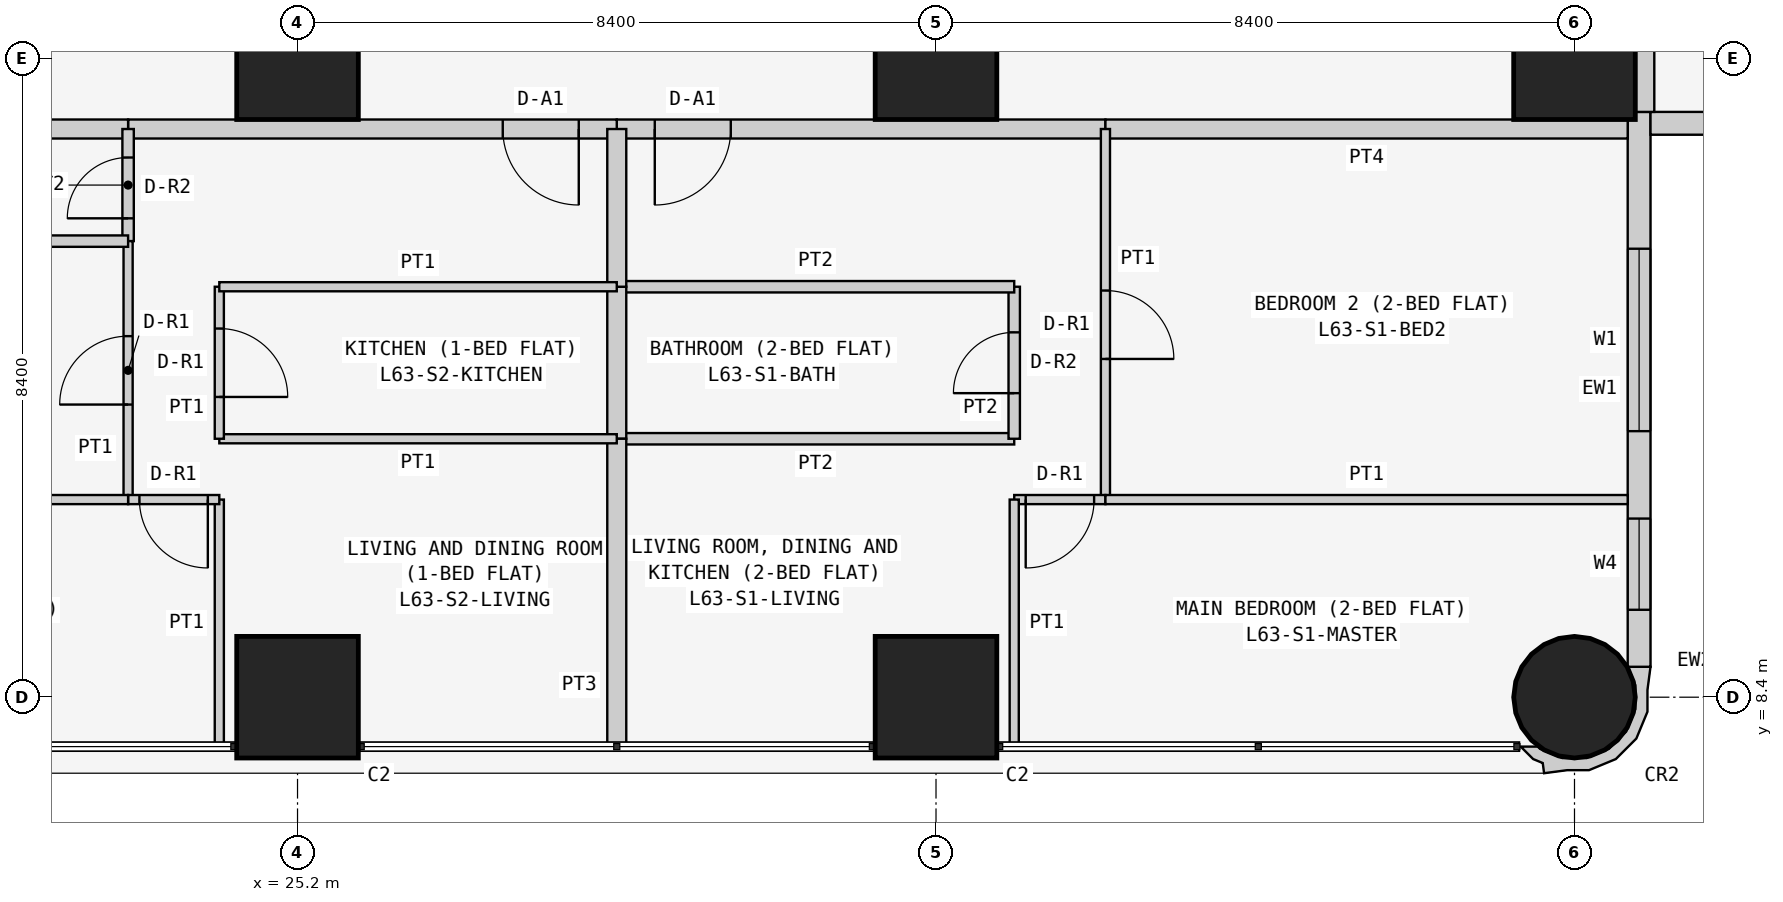
"""IFC4 building model, lengths in metres.
Left out: names, types, materials, properties, quantities, classifications, styles, units other than length and angle.
Written with IfcOpenShell. Run it as: python <this file> out.ifc"""

import sys

from ifc_helpers import new_model, si_unit, direction, frame, frame_2d, origin, origin_2d, place, context, subcontext, project, spatial, polyline, rectangle, circle, outline, extrude, element, fill, save


model = new_model("IFC4")
c1 = context("Model", 3, precision=1e-05, world=origin(), true_north=direction((0.0, 1.0)))
c2 = subcontext(c1, "Body", "Model", "MODEL_VIEW")
j1 = project(units=[si_unit("LENGTHUNIT", "METRE"), si_unit("PLANEANGLEUNIT", "RADIAN")], contexts=[c1])
p1 = place(None, origin())
s1 = spatial("IfcSite", under=j1, at=p1, CompositionType="ELEMENT")
p2 = place(p1, origin())
s2 = spatial("IfcBuilding", under=s1, at=p2, CompositionType="ELEMENT")
p3 = place(p2, frame((0.0, 0.0, 240.9)))
s3 = spatial("IfcBuildingStorey", under=s2, at=p3, CompositionType="ELEMENT", Elevation=240.9)
for number, where, z_axis, x_axis in (
    (1, (25.2, 8.4, 0.0), (0.0, 0.0, 1.0), (1.0, 0.0, 0.0)),
    (2, (25.2, 16.8, 0.0), (0.0, 0.0, 1.0), (1.0, 0.0, 0.0)),
    (3, (33.6, 8.4, 0.0), (0.0, 0.0, 1.0), (1.0, 0.0, 0.0)),
    (4, (33.6, 16.8, 0.0), (0.0, 0.0, 1.0), (1.0, 0.0, 0.0)),
):
    element("IfcColumn", number, at=place(p3, frame(where, z_axis=z_axis, x_axis=x_axis)), inside=s3, PredefinedType="COLUMN", context=c2, shape_type="SweptSolid", body=[
        extrude(rectangle(XDim=1.6, YDim=1.6, at=origin_2d()), origin(), (0.0, 0.0, 1.0), 3.6),
    ])
p4 = place(p3, frame((42.0, 8.4, 0.0), z_axis=(0.0, 0.0, 1.0), x_axis=(1.0, 0.0, 0.0)))
e5 = element("IfcColumn", 5, at=p4, inside=s3, PredefinedType="COLUMN", context=c2, shape_type="SweptSolid", body=[
    extrude(circle(Radius=0.8, at=origin_2d()), origin(), (0.0, 0.0, 1.0), 3.6),
])
p5 = place(p3, frame((42.0, 16.8, 0.0), z_axis=(0.0, 0.0, 1.0), x_axis=(1.0, 0.0, 0.0)))
e6 = element("IfcColumn", 6, at=p5, inside=s3, PredefinedType="COLUMN", context=c2, shape_type="SweptSolid", body=[
    extrude(rectangle(XDim=1.6, YDim=1.6, at=origin_2d()), origin(), (0.0, 0.0, 1.0), 3.6),
])
p6 = place(p3, frame((42.85, 8.8, 0.0), z_axis=(0.0, 0.0, 1.0), x_axis=(0.0, 1.0, 0.0)))
e7 = element("IfcWall", 7, at=p6, inside=s3, PredefinedType="SOLIDWALL", context=c2, shape_type="SweptSolid", body=[
    extrude(rectangle(XDim=7.3, YDim=0.3, at=frame_2d((3.65, 0.0))), origin(), (0.0, 0.0, 1.0), 3.45),
])
p7 = place(p6, frame((3.1, 0.0, 0.9)))
e8 = element("IfcOpeningElement", 8, at=p7, cuts=e7, PredefinedType="OPENING", context=c2, shape_type="SweptSolid", body=[
    extrude(rectangle(XDim=2.4, YDim=1.5, at=frame_2d((1.2, 0.75))), frame((0.0, 0.16, 0.0), z_axis=(0.0, -1.0, 0.0), x_axis=(1.0, 0.0, 0.0)), (0.0, 0.0, 1.0), 0.32),
])
p8 = place(p6, frame((0.75, 0.0, 0.9)))
e9 = element("IfcOpeningElement", 9, at=p8, cuts=e7, PredefinedType="OPENING", context=c2, shape_type="SweptSolid", body=[
    extrude(rectangle(XDim=1.2, YDim=1.5, at=frame_2d((0.6, 0.75))), frame((0.0, 0.16, 0.0), z_axis=(0.0, -1.0, 0.0), x_axis=(1.0, 0.0, 0.0)), (0.0, 0.0, 1.0), 0.32),
])
p9 = place(p3, frame((43.0, 15.95, 0.0), z_axis=(0.0, 0.0, 1.0), x_axis=(1.0, 0.0, 0.0)))
e10 = element("IfcWall", 10, at=p9, inside=s3, PredefinedType="SOLIDWALL", context=c2, shape_type="SweptSolid", body=[
    extrude(rectangle(XDim=7.0, YDim=0.3, at=frame_2d((3.5, 0.0))), origin(), (0.0, 0.0, 1.0), 3.45),
])
p10 = place(p9, frame((1.5, 0.0, 0.9)))
e11 = element("IfcOpeningElement", 11, at=p10, cuts=e10, PredefinedType="OPENING", context=c2, shape_type="SweptSolid", body=[
    extrude(rectangle(XDim=2.4, YDim=1.5, at=frame_2d((1.2, 0.75))), frame((0.0, 0.16, 0.0), z_axis=(0.0, -1.0, 0.0), x_axis=(1.0, 0.0, 0.0)), (0.0, 0.0, 1.0), 0.32),
])
p11 = place(p9, frame((5.05, 0.0, 0.9)))
e12 = element("IfcOpeningElement", 12, at=p11, cuts=e10, PredefinedType="OPENING", context=c2, shape_type="SweptSolid", body=[
    extrude(rectangle(XDim=1.2, YDim=1.5, at=frame_2d((0.6, 0.75))), frame((0.0, 0.16, 0.0), z_axis=(0.0, -1.0, 0.0), x_axis=(1.0, 0.0, 0.0)), (0.0, 0.0, 1.0), 0.32),
])
p12 = place(p3, frame((41.352, 7.805, 0.0), z_axis=(0.0, 0.0, 1.0), x_axis=(0.343276641956, -0.93923434088, 0.0)))
e13 = element("IfcWall", 13, at=p12, inside=s3, PredefinedType="SOLIDWALL", context=c2, shape_type="SweptSolid", body=[
    extrude(outline(polyline([(-0.369, 1.89), (-0.509, 1.621), (-0.49, 1.615), (-0.479, 1.609), (-0.211, 1.62), (0.088, 1.511), (0.323, 1.295), (0.457, 1.006), (0.47, 0.688), (0.361, 0.389), (0.145, 0.154), (0.108, 0.136), (0.031, -0.075), (0.241, 0.023), (0.333, 0.124), (0.465, 0.094), (0.532, 0.393), (0.631, 0.663), (0.614, 1.044), (0.453, 1.391), (0.172, 1.649), (-0.097, 1.748), (-0.369, 1.89)])), origin(), (0.0, 0.0, 1.0), 3.45),
])
p13 = place(p3, frame((42.925, 22.971, 0.0), z_axis=(0.0, 0.0, 1.0), x_axis=(0.0, -1.0, 0.0)))
e14 = element("IfcWall", 14, at=p13, inside=s3, PredefinedType="PARTITIONING", context=c2, shape_type="SweptSolid", body=[
    extrude(rectangle(XDim=6.871, YDim=0.25, at=frame_2d((3.436, 0.0))), origin(), (0.0, 0.0, 1.0), 3.45),
])
p14 = place(p3, frame((35.829, 15.875, 0.0), z_axis=(0.0, 0.0, 1.0), x_axis=(-1.0, 0.0, 0.0)))
e15 = element("IfcWall", 15, at=p14, inside=s3, PredefinedType="PARTITIONING", context=c2, shape_type="SweptSolid", body=[
    extrude(rectangle(XDim=6.429, YDim=0.25, at=frame_2d((3.215, 0.0))), origin(), (0.0, 0.0, 1.0), 3.45),
])
p15 = place(p14, frame((4.929, 0.0, 0.0)))
e16 = element("IfcOpeningElement", 16, at=p15, cuts=e15, PredefinedType="OPENING", context=c2, shape_type="SweptSolid", body=[
    extrude(rectangle(XDim=1.0, YDim=2.1, at=frame_2d((0.5, 1.05))), frame((0.0, 0.135, 0.0), z_axis=(0.0, -1.0, 0.0), x_axis=(1.0, 0.0, 0.0)), (0.0, 0.0, 1.0), 0.27),
])
p16 = place(p3, frame((42.7, 15.875, 0.0), z_axis=(0.0, 0.0, 1.0), x_axis=(-1.0, 0.0, 0.0)))
e17 = element("IfcWall", 17, at=p16, inside=s3, PredefinedType="PARTITIONING", context=c2, shape_type="SweptSolid", body=[
    extrude(rectangle(XDim=6.871, YDim=0.25, at=frame_2d((3.436, 0.0))), origin(), (0.0, 0.0, 1.0), 3.45),
])
p17 = place(p3, frame((29.4, 15.875, 0.0), z_axis=(0.0, 0.0, 1.0), x_axis=(-1.0, 0.0, 0.0)))
e18 = element("IfcWall", 18, at=p17, inside=s3, PredefinedType="PARTITIONING", context=c2, shape_type="SweptSolid", body=[
    extrude(rectangle(XDim=6.429, YDim=0.25, at=frame_2d((3.214, 0.0))), origin(), (0.0, 0.0, 1.0), 3.45),
])
p18 = place(p17, frame((0.5, 0.0, 0.0)))
e19 = element("IfcOpeningElement", 19, at=p18, cuts=e18, PredefinedType="OPENING", context=c2, shape_type="SweptSolid", body=[
    extrude(rectangle(XDim=1.0, YDim=2.1, at=frame_2d((0.5, 1.05))), frame((0.0, 0.135, 0.0), z_axis=(0.0, -1.0, 0.0), x_axis=(1.0, 0.0, 0.0)), (0.0, 0.0, 1.0), 0.27),
])
p19 = place(p3, frame((22.971, 15.875, 0.0), z_axis=(0.0, 0.0, 1.0), x_axis=(-1.0, 0.0, 0.0)))
e20 = element("IfcWall", 20, at=p19, inside=s3, PredefinedType="PARTITIONING", context=c2, shape_type="SweptSolid", body=[
    extrude(rectangle(XDim=6.871, YDim=0.25, at=frame_2d((3.436, 0.0))), origin(), (0.0, 0.0, 1.0), 3.45),
])
p20 = place(p3, frame((29.4, 11.8, 0.0), z_axis=(0.0, 0.0, 1.0), x_axis=(1.0, 0.0, 0.0)))
e21 = element("IfcWall", 21, at=p20, inside=s3, PredefinedType="PARTITIONING", context=c2, shape_type="SweptSolid", body=[
    extrude(rectangle(XDim=5.229, YDim=0.15, at=frame_2d((2.615, 0.0))), origin(), (0.0, 0.0, 1.0), 3.45),
])
p21 = place(p3, frame((34.629, 11.8, 0.0), z_axis=(0.0, 0.0, 1.0), x_axis=(0.0, 1.0, 0.0)))
e22 = element("IfcWall", 22, at=p21, inside=s3, PredefinedType="PARTITIONING", context=c2, shape_type="SweptSolid", body=[
    extrude(rectangle(XDim=2.0, YDim=0.15, at=frame_2d((1.0, 0.0))), origin(), (0.0, 0.0, 1.0), 3.45),
])
p22 = place(p21, frame((0.6, 0.0, 0.0)))
e23 = element("IfcOpeningElement", 23, at=p22, cuts=e22, PredefinedType="OPENING", context=c2, shape_type="SweptSolid", body=[
    extrude(rectangle(XDim=0.8, YDim=2.1, at=frame_2d((0.4, 1.05))), frame((0.0, 0.085, 0.0), z_axis=(0.0, -1.0, 0.0), x_axis=(1.0, 0.0, 0.0)), (0.0, 0.0, 1.0), 0.17),
])
p23 = place(p3, frame((34.629, 13.8, 0.0), z_axis=(0.0, 0.0, 1.0), x_axis=(-1.0, 0.0, 0.0)))
e24 = element("IfcWall", 24, at=p23, inside=s3, PredefinedType="PARTITIONING", context=c2, shape_type="SweptSolid", body=[
    extrude(rectangle(XDim=5.229, YDim=0.15, at=frame_2d((2.615, 0.0))), origin(), (0.0, 0.0, 1.0), 3.45),
])
p24 = place(p3, frame((29.4, 13.8, 0.0), z_axis=(0.0, 0.0, 1.0), x_axis=(0.0, -1.0, 0.0)))
e25 = element("IfcWall", 25, at=p24, inside=s3, PredefinedType="PARTITIONING", context=c2, shape_type="SweptSolid", body=[
    extrude(rectangle(XDim=2.0, YDim=0.25, at=frame_2d((1.0, 0.0))), origin(), (0.0, 0.0, 1.0), 2.848),
])
p25 = place(p3, frame((35.829, 15.875, 0.0), z_axis=(0.0, 0.0, 1.0), x_axis=(0.0, -1.0, 0.0)))
e26 = element("IfcWall", 26, at=p25, inside=s3, PredefinedType="PARTITIONING", context=c2, shape_type="SweptSolid", body=[
    extrude(rectangle(XDim=4.875, YDim=0.12, at=frame_2d((2.438, 0.0))), origin(), (0.0, 0.0, 1.0), 3.45),
])
p26 = place(p25, frame((2.125, 0.0, 0.0)))
e27 = element("IfcOpeningElement", 27, at=p26, cuts=e26, PredefinedType="OPENING", context=c2, shape_type="SweptSolid", body=[
    extrude(rectangle(XDim=0.9, YDim=2.1, at=frame_2d((0.45, 1.05))), frame((0.0, 0.07, 0.0), z_axis=(0.0, -1.0, 0.0), x_axis=(1.0, 0.0, 0.0)), (0.0, 0.0, 1.0), 0.14),
])
p27 = place(p3, frame((35.829, 11.0, 0.0), z_axis=(0.0, 0.0, 1.0), x_axis=(-1.0, 0.0, 0.0)))
e28 = element("IfcWall", 28, at=p27, inside=s3, PredefinedType="PARTITIONING", context=c2, shape_type="SweptSolid", body=[
    extrude(rectangle(XDim=1.2, YDim=0.12, at=frame_2d((0.6, 0.0))), origin(), (0.0, 0.0, 1.0), 3.45),
])
p28 = place(p27, frame((0.149, 0.0, 0.0)))
e29 = element("IfcOpeningElement", 29, at=p28, cuts=e28, PredefinedType="OPENING", context=c2, shape_type="SweptSolid", body=[
    extrude(rectangle(XDim=0.9, YDim=2.1, at=frame_2d((0.45, 1.05))), frame((0.0, 0.07, 0.0), z_axis=(0.0, -1.0, 0.0), x_axis=(1.0, 0.0, 0.0)), (0.0, 0.0, 1.0), 0.14),
])
p29 = place(p3, frame((34.629, 11.0, 0.0), z_axis=(0.0, 0.0, 1.0), x_axis=(0.0, -1.0, 0.0)))
e30 = element("IfcWall", 30, at=p29, inside=s3, PredefinedType="PARTITIONING", context=c2, shape_type="SweptSolid", body=[
    extrude(rectangle(XDim=3.25, YDim=0.12, at=frame_2d((1.625, 0.0))), origin(), (0.0, 0.0, 1.0), 3.45),
])
p30 = place(p3, frame((29.4, 7.75, 0.0), z_axis=(0.0, 0.0, 1.0), x_axis=(0.0, 1.0, 0.0)))
e31 = element("IfcWall", 31, at=p30, inside=s3, PredefinedType="PARTITIONING", context=c2, shape_type="SweptSolid", body=[
    extrude(rectangle(XDim=4.05, YDim=0.25, at=frame_2d((2.025, 0.0))), origin(), (0.0, 0.0, 1.0), 2.848),
])
p31 = place(p3, frame((29.4, 13.8, 0.0), z_axis=(0.0, 0.0, 1.0), x_axis=(0.0, 1.0, 0.0)))
e32 = element("IfcWall", 32, at=p31, inside=s3, PredefinedType="PARTITIONING", context=c2, shape_type="SweptSolid", body=[
    extrude(rectangle(XDim=2.075, YDim=0.25, at=frame_2d((1.038, 0.0))), origin(), (0.0, 0.0, 1.0), 2.848),
])
p32 = place(p3, frame((35.829, 11.0, 0.0), z_axis=(0.0, 0.0, 1.0), x_axis=(1.0, 0.0, 0.0)))
e33 = element("IfcWall", 33, at=p32, inside=s3, PredefinedType="PARTITIONING", context=c2, shape_type="SweptSolid", body=[
    extrude(rectangle(XDim=6.871, YDim=0.12, at=frame_2d((3.436, 0.0))), origin(), (0.0, 0.0, 1.0), 3.45),
])
p33 = place(p3, frame((29.4, 11.8, 0.0), z_axis=(0.0, 0.0, 1.0), x_axis=(-1.0, 0.0, 0.0)))
e34 = element("IfcWall", 34, at=p33, inside=s3, PredefinedType="PARTITIONING", context=c2, shape_type="SweptSolid", body=[
    extrude(rectangle(XDim=5.229, YDim=0.12, at=frame_2d((2.615, 0.0))), origin(), (0.0, 0.0, 1.0), 3.45),
])
p34 = place(p3, frame((24.171, 11.8, 0.0), z_axis=(0.0, 0.0, 1.0), x_axis=(0.0, 1.0, 0.0)))
e35 = element("IfcWall", 35, at=p34, inside=s3, PredefinedType="PARTITIONING", context=c2, shape_type="SweptSolid", body=[
    extrude(rectangle(XDim=2.0, YDim=0.12, at=frame_2d((1.0, 0.0))), origin(), (0.0, 0.0, 1.0), 3.45),
])
p35 = place(p34, frame((0.55, 0.0, 0.0)))
e36 = element("IfcOpeningElement", 36, at=p35, cuts=e35, PredefinedType="OPENING", context=c2, shape_type="SweptSolid", body=[
    extrude(rectangle(XDim=0.9, YDim=2.1, at=frame_2d((0.45, 1.05))), frame((0.0, 0.07, 0.0), z_axis=(0.0, -1.0, 0.0), x_axis=(1.0, 0.0, 0.0)), (0.0, 0.0, 1.0), 0.14),
])
p36 = place(p3, frame((24.171, 13.8, 0.0), z_axis=(0.0, 0.0, 1.0), x_axis=(1.0, 0.0, 0.0)))
e37 = element("IfcWall", 37, at=p36, inside=s3, PredefinedType="PARTITIONING", context=c2, shape_type="SweptSolid", body=[
    extrude(rectangle(XDim=5.229, YDim=0.12, at=frame_2d((2.615, 0.0))), origin(), (0.0, 0.0, 1.0), 3.45),
])
p37 = place(p3, frame((22.971, 14.4, 0.0), z_axis=(0.0, 0.0, 1.0), x_axis=(0.0, 1.0, 0.0)))
e38 = element("IfcWall", 38, at=p37, inside=s3, PredefinedType="PARTITIONING", context=c2, shape_type="SweptSolid", body=[
    extrude(rectangle(XDim=1.475, YDim=0.15, at=frame_2d((0.738, 0.0))), origin(), (0.0, 0.0, 1.0), 3.45),
])
p38 = place(p37, frame((0.3, 0.0, 0.0)))
e39 = element("IfcOpeningElement", 39, at=p38, cuts=e38, PredefinedType="OPENING", context=c2, shape_type="SweptSolid", body=[
    extrude(rectangle(XDim=0.8, YDim=2.1, at=frame_2d((0.4, 1.05))), frame((0.0, 0.085, 0.0), z_axis=(0.0, -1.0, 0.0), x_axis=(1.0, 0.0, 0.0)), (0.0, 0.0, 1.0), 0.17),
])
p39 = place(p3, frame((22.971, 11.0, 0.0), z_axis=(0.0, 0.0, 1.0), x_axis=(0.0, 1.0, 0.0)))
e40 = element("IfcWall", 40, at=p39, inside=s3, PredefinedType="PARTITIONING", context=c2, shape_type="SweptSolid", body=[
    extrude(rectangle(XDim=3.4, YDim=0.12, at=frame_2d((1.7, 0.0))), origin(), (0.0, 0.0, 1.0), 3.45),
])
p40 = place(p39, frame((1.25, 0.0, 0.0)))
e41 = element("IfcOpeningElement", 41, at=p40, cuts=e40, PredefinedType="OPENING", context=c2, shape_type="SweptSolid", body=[
    extrude(rectangle(XDim=0.9, YDim=2.1, at=frame_2d((0.45, 1.05))), frame((0.0, 0.07, 0.0), z_axis=(0.0, -1.0, 0.0), x_axis=(1.0, 0.0, 0.0)), (0.0, 0.0, 1.0), 0.14),
])
p41 = place(p3, frame((24.171, 7.75, 0.0), z_axis=(0.0, 0.0, 1.0), x_axis=(0.0, 1.0, 0.0)))
e42 = element("IfcWall", 42, at=p41, inside=s3, PredefinedType="PARTITIONING", context=c2, shape_type="SweptSolid", body=[
    extrude(rectangle(XDim=3.25, YDim=0.12, at=frame_2d((1.625, 0.0))), origin(), (0.0, 0.0, 1.0), 3.45),
])
p42 = place(p3, frame((24.171, 11.0, 0.0), z_axis=(0.0, 0.0, 1.0), x_axis=(-1.0, 0.0, 0.0)))
e43 = element("IfcWall", 43, at=p42, inside=s3, PredefinedType="PARTITIONING", context=c2, shape_type="SweptSolid", body=[
    extrude(rectangle(XDim=1.2, YDim=0.12, at=frame_2d((0.6, 0.0))), origin(), (0.0, 0.0, 1.0), 3.45),
])
p43 = place(p42, frame((0.151, 0.0, 0.0)))
e44 = element("IfcOpeningElement", 44, at=p43, cuts=e43, PredefinedType="OPENING", context=c2, shape_type="SweptSolid", body=[
    extrude(rectangle(XDim=0.9, YDim=2.1, at=frame_2d((0.45, 1.05))), frame((0.0, 0.07, 0.0), z_axis=(0.0, -1.0, 0.0), x_axis=(1.0, 0.0, 0.0)), (0.0, 0.0, 1.0), 0.14),
])
p44 = place(p3, frame((22.971, 14.4, 0.0), z_axis=(0.0, 0.0, 1.0), x_axis=(-1.0, 0.0, 0.0)))
e45 = element("IfcWall", 45, at=p44, inside=s3, PredefinedType="PARTITIONING", context=c2, shape_type="SweptSolid", body=[
    extrude(rectangle(XDim=6.871, YDim=0.15, at=frame_2d((3.436, 0.0))), origin(), (0.0, 0.0, 1.0), 3.45),
])
p45 = place(p3, frame((22.971, 11.0, 0.0), z_axis=(0.0, 0.0, 1.0), x_axis=(-1.0, 0.0, 0.0)))
e46 = element("IfcWall", 46, at=p45, inside=s3, PredefinedType="PARTITIONING", context=c2, shape_type="SweptSolid", body=[
    extrude(rectangle(XDim=6.871, YDim=0.12, at=frame_2d((3.436, 0.0))), origin(), (0.0, 0.0, 1.0), 3.45),
])
p46 = place(p7, origin())
e47 = element("IfcWindow", 47, at=p46, inside=s3, PartitioningType="SINGLE_PANEL", PredefinedType="WINDOW", context=c2, shape_type="SweptSolid", body=[
    extrude(rectangle(XDim=2.4, YDim=1.5, at=frame_2d((1.2, 0.75))), frame((0.0, 0.03, 0.0), z_axis=(0.0, -1.0, 0.0), x_axis=(1.0, 0.0, 0.0)), (0.0, 0.0, 1.0), 0.06),
])
fill(e8, e47)
p47 = place(p8, origin())
e48 = element("IfcWindow", 48, at=p47, inside=s3, PartitioningType="SINGLE_PANEL", PredefinedType="WINDOW", context=c2, shape_type="SweptSolid", body=[
    extrude(rectangle(XDim=1.2, YDim=1.5, at=frame_2d((0.6, 0.75))), frame((0.0, 0.03, 0.0), z_axis=(0.0, -1.0, 0.0), x_axis=(1.0, 0.0, 0.0)), (0.0, 0.0, 1.0), 0.06),
])
fill(e9, e48)
p48 = place(p15, origin())
e49 = element("IfcDoor", 49, at=p48, inside=s3, OperationType="SINGLE_SWING_RIGHT", PredefinedType="DOOR", context=c2, shape_type="SweptSolid", body=[
    extrude(rectangle(XDim=1.0, YDim=2.1, at=frame_2d((0.5, 1.05))), frame((0.0, 0.025, 0.0), z_axis=(0.0, -1.0, 0.0), x_axis=(1.0, 0.0, 0.0)), (0.0, 0.0, 1.0), 0.05),
])
fill(e16, e49)
p49 = place(p22, origin())
e50 = element("IfcDoor", 50, at=p49, inside=s3, OperationType="SINGLE_SWING_LEFT", PredefinedType="DOOR", context=c2, shape_type="SweptSolid", body=[
    extrude(rectangle(XDim=0.8, YDim=2.1, at=frame_2d((0.4, 1.05))), frame((0.0, 0.025, 0.0), z_axis=(0.0, -1.0, 0.0), x_axis=(1.0, 0.0, 0.0)), (0.0, 0.0, 1.0), 0.05),
])
fill(e23, e50)
p50 = place(p26, origin())
e51 = element("IfcDoor", 51, at=p50, inside=s3, OperationType="SINGLE_SWING_RIGHT", PredefinedType="DOOR", context=c2, shape_type="SweptSolid", body=[
    extrude(rectangle(XDim=0.9, YDim=2.1, at=frame_2d((0.45, 1.05))), frame((0.0, 0.025, 0.0), z_axis=(0.0, -1.0, 0.0), x_axis=(1.0, 0.0, 0.0)), (0.0, 0.0, 1.0), 0.05),
])
fill(e27, e51)
p51 = place(p28, origin())
e52 = element("IfcDoor", 52, at=p51, inside=s3, OperationType="SINGLE_SWING_RIGHT", PredefinedType="DOOR", context=c2, shape_type="SweptSolid", body=[
    extrude(rectangle(XDim=0.9, YDim=2.1, at=frame_2d((0.45, 1.05))), frame((0.0, 0.025, 0.0), z_axis=(0.0, -1.0, 0.0), x_axis=(1.0, 0.0, 0.0)), (0.0, 0.0, 1.0), 0.05),
])
fill(e29, e52)
p52 = place(p18, origin())
e53 = element("IfcDoor", 53, at=p52, inside=s3, OperationType="SINGLE_SWING_LEFT", PredefinedType="DOOR", context=c2, shape_type="SweptSolid", body=[
    extrude(rectangle(XDim=1.0, YDim=2.1, at=frame_2d((0.5, 1.05))), frame((0.0, 0.025, 0.0), z_axis=(0.0, -1.0, 0.0), x_axis=(1.0, 0.0, 0.0)), (0.0, 0.0, 1.0), 0.05),
])
fill(e19, e53)
p53 = place(p35, frame((0.9, 0.0, 0.0), z_axis=(0.0, 0.0, 1.0), x_axis=(-1.0, 0.0, 0.0)))
e54 = element("IfcDoor", 54, at=p53, inside=s3, OperationType="SINGLE_SWING_RIGHT", PredefinedType="DOOR", context=c2, shape_type="SweptSolid", body=[
    extrude(rectangle(XDim=0.9, YDim=2.1, at=frame_2d((0.45, 1.05))), frame((0.0, 0.025, 0.0), z_axis=(0.0, -1.0, 0.0), x_axis=(1.0, 0.0, 0.0)), (0.0, 0.0, 1.0), 0.05),
])
fill(e36, e54)
p54 = place(p38, origin())
e55 = element("IfcDoor", 55, at=p54, inside=s3, OperationType="SINGLE_SWING_LEFT", PredefinedType="DOOR", context=c2, shape_type="SweptSolid", body=[
    extrude(rectangle(XDim=0.8, YDim=2.1, at=frame_2d((0.4, 1.05))), frame((0.0, 0.025, 0.0), z_axis=(0.0, -1.0, 0.0), x_axis=(1.0, 0.0, 0.0)), (0.0, 0.0, 1.0), 0.05),
])
fill(e39, e55)
p55 = place(p40, origin())
e56 = element("IfcDoor", 56, at=p55, inside=s3, OperationType="SINGLE_SWING_LEFT", PredefinedType="DOOR", context=c2, shape_type="SweptSolid", body=[
    extrude(rectangle(XDim=0.9, YDim=2.1, at=frame_2d((0.45, 1.05))), frame((0.0, 0.025, 0.0), z_axis=(0.0, -1.0, 0.0), x_axis=(1.0, 0.0, 0.0)), (0.0, 0.0, 1.0), 0.05),
])
fill(e41, e56)
p56 = place(p43, origin())
e57 = element("IfcDoor", 57, at=p56, inside=s3, OperationType="SINGLE_SWING_LEFT", PredefinedType="DOOR", context=c2, shape_type="SweptSolid", body=[
    extrude(rectangle(XDim=0.9, YDim=2.1, at=frame_2d((0.45, 1.05))), frame((0.0, 0.025, 0.0), z_axis=(0.0, -1.0, 0.0), x_axis=(1.0, 0.0, 0.0)), (0.0, 0.0, 1.0), 0.05),
])
fill(e44, e57)
save(model, sys.argv[1])
